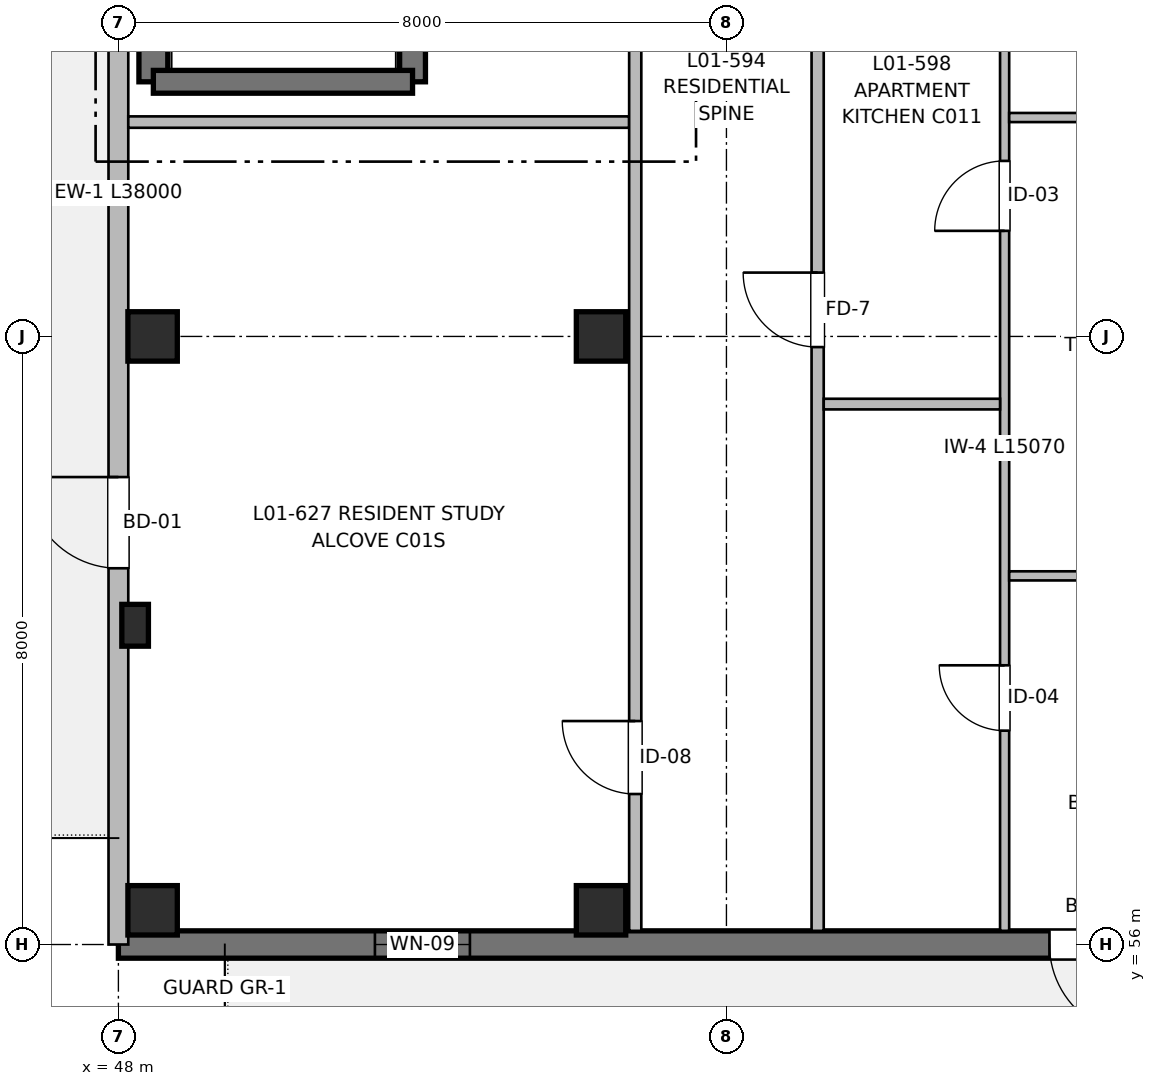
"""IFC4 building model, lengths in metres.
Left out: names, types, materials, properties, quantities, classifications, styles, units other than length and angle.
Written with IfcOpenShell. Run it as: python <this file> out.ifc"""

import sys

from ifc_helpers import new_model, si_unit, direction, frame, frame_2d, origin, origin_2d, place, context, subcontext, project, spatial, rectangle, extrude, element, fill, save


model = new_model("IFC4")
c1 = context("Model", 3, precision=1e-05, world=origin(), true_north=direction((0.0, 1.0)))
c2 = subcontext(c1, "Body", "Model", "MODEL_VIEW")
j1 = project(units=[si_unit("LENGTHUNIT", "METRE"), si_unit("PLANEANGLEUNIT", "RADIAN")], contexts=[c1])
p1 = place(None, origin())
s1 = spatial("IfcSite", under=j1, at=p1, CompositionType="ELEMENT")
p2 = place(p1, origin())
s2 = spatial("IfcBuilding", under=s1, at=p2, CompositionType="ELEMENT")
p3 = place(p2, frame((0.0, 0.0, 4.16)))
s3 = spatial("IfcBuildingStorey", under=s2, at=p3, CompositionType="ELEMENT", Elevation=4.16)
p4 = place(p3, frame((48.22, 60.2, 0.0), z_axis=(0.0, 0.0, 1.0), x_axis=(1.0, 0.0, 0.0)))
e1 = element("IfcColumn", 1, at=p4, inside=s3, PredefinedType="PILASTER", context=c2, shape_type="SweptSolid", body=[
    extrude(rectangle(XDim=0.35, YDim=0.55, at=origin_2d()), origin(), (0.0, 0.0, 1.0), 3.2),
])
for number, where, z_axis, x_axis in (
    (2, (48.45, 56.45, 0.0), (0.0, 0.0, 1.0), (1.0, 0.0, 0.0)),
    (3, (48.45, 64.0, 0.0), (0.0, 0.0, 1.0), (1.0, 0.0, 0.0)),
    (4, (54.35, 56.45, 0.0), (0.0, 0.0, 1.0), (1.0, 0.0, 0.0)),
    (5, (54.35, 64.0, 0.0), (0.0, 0.0, 1.0), (1.0, 0.0, 0.0)),
):
    element("IfcColumn", number, at=place(p3, frame(where, z_axis=z_axis, x_axis=x_axis)), inside=s3, PredefinedType="COLUMN", context=c2, shape_type="SweptSolid", body=[
        extrude(rectangle(XDim=0.65, YDim=0.65, at=origin_2d()), origin(), (0.0, 0.0, 1.0), 3.2),
    ])
p5 = place(p3, frame((48.46, 67.35, 0.0), z_axis=(0.0, 0.0, 1.0), x_axis=(0.0, 1.0, 0.0)))
e6 = element("IfcWall", 6, at=p5, inside=s3, PredefinedType="SHEAR", context=c2, shape_type="SweptSolid", body=[
    extrude(rectangle(XDim=12.45, YDim=0.38, at=frame_2d((6.225, 0.0))), origin(), (0.0, 0.0, 1.0), 3.2),
])
p6 = place(p5, frame((2.2, 0.0, 0.97)))
e7 = element("IfcOpeningElement", 7, at=p6, cuts=e6, PredefinedType="OPENING", context=c2, shape_type="SweptSolid", body=[
    extrude(rectangle(XDim=0.95, YDim=1.25, at=frame_2d((0.475, 0.625))), frame((0.0, 0.2, 0.0), z_axis=(0.0, -1.0, 0.0), x_axis=(1.0, 0.0, 0.0)), (0.0, 0.0, 1.0), 0.4),
])
p7 = place(p3, frame((51.87, 79.8, 0.0), z_axis=(0.0, 0.0, 1.0), x_axis=(0.0, -1.0, 0.0)))
e8 = element("IfcWall", 8, at=p7, inside=s3, PredefinedType="SHEAR", context=c2, shape_type="SweptSolid", body=[
    extrude(rectangle(XDim=12.45, YDim=0.34, at=frame_2d((6.225, 0.0))), origin(), (0.0, 0.0, 1.0), 3.2),
])
p8 = place(p7, frame((10.85, 0.0, 0.0)))
e9 = element("IfcOpeningElement", 9, at=p8, cuts=e8, PredefinedType="OPENING", context=c2, shape_type="SweptSolid", body=[
    extrude(rectangle(XDim=1.05, YDim=2.15, at=frame_2d((0.525, 1.075))), frame((0.0, 0.18, 0.0), z_axis=(0.0, -1.0, 0.0), x_axis=(1.0, 0.0, 0.0)), (0.0, 0.0, 1.0), 0.36),
])
p9 = place(p3, frame((51.87, 67.35, 0.0), z_axis=(0.0, 0.0, 1.0), x_axis=(-1.0, 0.0, 0.0)))
e10 = element("IfcWall", 10, at=p9, inside=s3, PredefinedType="SHEAR", context=c2, shape_type="SweptSolid", body=[
    extrude(rectangle(XDim=3.41, YDim=0.3, at=frame_2d((1.705, 0.0))), origin(), (0.0, 0.0, 1.0), 3.2),
])
p10 = place(p3, frame((64.0, 56.0, 0.0), z_axis=(0.0, 0.0, 1.0), x_axis=(-1.0, 0.0, 0.0)))
e11 = element("IfcWall", 11, at=p10, inside=s3, PredefinedType="SHEAR", context=c2, shape_type="SweptSolid", body=[
    extrude(rectangle(XDim=16.0, YDim=0.36, at=frame_2d((8.0, 0.0))), origin(), (0.0, 0.0, 1.0), 2.98),
])
p11 = place(p10, frame((2.55, 0.0, 0.0)))
e12 = element("IfcOpeningElement", 12, at=p11, cuts=e11, PredefinedType="OPENING", context=c2, shape_type="SweptSolid", body=[
    extrude(rectangle(XDim=1.2, YDim=2.2, at=frame_2d((0.6, 1.1))), frame((0.0, 0.19, 0.0), z_axis=(0.0, -1.0, 0.0), x_axis=(1.0, 0.0, 0.0)), (0.0, 0.0, 1.0), 0.38),
])
p12 = place(p10, frame((11.375, 0.0, 0.87)))
e13 = element("IfcOpeningElement", 13, at=p12, cuts=e11, PredefinedType="OPENING", context=c2, shape_type="SweptSolid", body=[
    extrude(rectangle(XDim=1.25, YDim=1.35, at=frame_2d((0.625, 0.675))), frame((0.0, 0.19, 0.0), z_axis=(0.0, -1.0, 0.0), x_axis=(1.0, 0.0, 0.0)), (0.0, 0.0, 1.0), 0.38),
])
p13 = place(p3, frame((48.0, 56.0, 0.0), z_axis=(0.0, 0.0, 1.0), x_axis=(0.0, 1.0, 0.0)))
e14 = element("IfcWall", 14, at=p13, inside=s3, PredefinedType="SOLIDWALL", context=c2, shape_type="SweptSolid", body=[
    extrude(rectangle(XDim=38.0, YDim=0.26, at=frame_2d((19.0, 0.0))), origin(), (0.0, 0.0, 1.0), 2.98),
])
p14 = place(p13, frame((4.95, 0.0, 0.0)))
e15 = element("IfcOpeningElement", 15, at=p14, cuts=e14, PredefinedType="OPENING", context=c2, shape_type="SweptSolid", body=[
    extrude(rectangle(XDim=1.2, YDim=2.2, at=frame_2d((0.6, 1.1))), frame((0.0, 0.14, 0.0), z_axis=(0.0, -1.0, 0.0), x_axis=(1.0, 0.0, 0.0)), (0.0, 0.0, 1.0), 0.28),
])
p15 = place(p13, frame((13.625, 0.0, 0.87)))
e16 = element("IfcOpeningElement", 16, at=p15, cuts=e14, PredefinedType="OPENING", context=c2, shape_type="SweptSolid", body=[
    extrude(rectangle(XDim=1.25, YDim=1.35, at=frame_2d((0.625, 0.675))), frame((0.0, 0.14, 0.0), z_axis=(0.0, -1.0, 0.0), x_axis=(1.0, 0.0, 0.0)), (0.0, 0.0, 1.0), 0.28),
])
p16 = place(p13, frame((23.95, 0.0, 0.82)))
e17 = element("IfcOpeningElement", 17, at=p16, cuts=e14, PredefinedType="OPENING", context=c2, shape_type="SweptSolid", body=[
    extrude(rectangle(XDim=1.3, YDim=1.4, at=frame_2d((0.65, 0.7))), frame((0.0, 0.14, 0.0), z_axis=(0.0, -1.0, 0.0), x_axis=(1.0, 0.0, 0.0)), (0.0, 0.0, 1.0), 0.28),
])
p17 = place(p13, frame((32.2, 0.0, 0.67)))
e18 = element("IfcOpeningElement", 18, at=p17, cuts=e14, PredefinedType="OPENING", context=c2, shape_type="SweptSolid", body=[
    extrude(rectangle(XDim=2.1, YDim=1.55, at=frame_2d((1.05, 0.775))), frame((0.0, 0.14, 0.0), z_axis=(0.0, -1.0, 0.0), x_axis=(1.0, 0.0, 0.0)), (0.0, 0.0, 1.0), 0.28),
])
p18 = place(p3, frame((48.13, 66.82, 0.0), z_axis=(0.0, 0.0, 1.0), x_axis=(1.0, 0.0, 0.0)))
e19 = element("IfcWall", 19, at=p18, inside=s3, PredefinedType="PARTITIONING", context=c2, shape_type="SweptSolid", body=[
    extrude(rectangle(XDim=6.59, YDim=0.15, at=frame_2d((3.295, 0.0))), origin(), (0.0, 0.0, 1.0), 2.935),
])
p19 = place(p3, frame((54.8, 56.18, 0.0), z_axis=(0.0, 0.0, 1.0), x_axis=(0.0, 1.0, 0.0)))
e20 = element("IfcWall", 20, at=p19, inside=s3, PredefinedType="PARTITIONING", context=c2, shape_type="SweptSolid", body=[
    extrude(rectangle(XDim=50.62, YDim=0.16, at=frame_2d((25.31, 0.0))), origin(), (0.0, 0.0, 1.0), 2.935),
])
p20 = place(p19, frame((12.82, 0.0, 0.0)))
e21 = element("IfcOpeningElement", 21, at=p20, cuts=e20, PredefinedType="OPENING", context=c2, shape_type="SweptSolid", body=[
    extrude(rectangle(XDim=1.1, YDim=2.15, at=frame_2d((0.55, 1.075))), frame((0.0, 0.09, 0.0), z_axis=(0.0, -1.0, 0.0), x_axis=(1.0, 0.0, 0.0)), (0.0, 0.0, 1.0), 0.18),
])
p21 = place(p19, frame((19.22, 0.0, 0.0)))
e22 = element("IfcOpeningElement", 22, at=p21, cuts=e20, PredefinedType="OPENING", context=c2, shape_type="SweptSolid", body=[
    extrude(rectangle(XDim=1.6, YDim=2.15, at=frame_2d((0.8, 1.075))), frame((0.0, 0.09, 0.0), z_axis=(0.0, -1.0, 0.0), x_axis=(1.0, 0.0, 0.0)), (0.0, 0.0, 1.0), 0.18),
])
p22 = place(p19, frame((1.8, 0.0, 0.0)))
e23 = element("IfcOpeningElement", 23, at=p22, cuts=e20, PredefinedType="OPENING", context=c2, shape_type="SweptSolid", body=[
    extrude(rectangle(XDim=0.96, YDim=2.15, at=frame_2d((0.48, 1.075))), frame((0.0, 0.09, 0.0), z_axis=(0.0, -1.0, 0.0), x_axis=(1.0, 0.0, 0.0)), (0.0, 0.0, 1.0), 0.18),
])
p23 = place(p19, frame((32.725, 0.0, 0.0)))
e24 = element("IfcOpeningElement", 24, at=p23, cuts=e20, PredefinedType="OPENING", context=c2, shape_type="SweptSolid", body=[
    extrude(rectangle(XDim=0.98, YDim=2.15, at=frame_2d((0.49, 1.075))), frame((0.0, 0.09, 0.0), z_axis=(0.0, -1.0, 0.0), x_axis=(1.0, 0.0, 0.0)), (0.0, 0.0, 1.0), 0.18),
])
p24 = place(p19, frame((40.935, 0.0, 0.0)))
e25 = element("IfcOpeningElement", 25, at=p24, cuts=e20, PredefinedType="OPENING", context=c2, shape_type="SweptSolid", body=[
    extrude(rectangle(XDim=0.98, YDim=2.15, at=frame_2d((0.49, 1.075))), frame((0.0, 0.09, 0.0), z_axis=(0.0, -1.0, 0.0), x_axis=(1.0, 0.0, 0.0)), (0.0, 0.0, 1.0), 0.18),
])
p25 = place(p3, frame((57.2, 56.18, 0.0), z_axis=(0.0, 0.0, 1.0), x_axis=(0.0, 1.0, 0.0)))
e26 = element("IfcWall", 26, at=p25, inside=s3, PredefinedType="PARTITIONING", context=c2, shape_type="SweptSolid", body=[
    extrude(rectangle(XDim=50.62, YDim=0.16, at=frame_2d((25.31, 0.0))), origin(), (0.0, 0.0, 1.0), 2.935),
])
p26 = place(p25, frame((7.68, 0.0, 0.0)))
e27 = element("IfcOpeningElement", 27, at=p26, cuts=e26, PredefinedType="OPENING", context=c2, shape_type="SweptSolid", body=[
    extrude(rectangle(XDim=0.98, YDim=2.15, at=frame_2d((0.49, 1.075))), frame((0.0, 0.09, 0.0), z_axis=(0.0, -1.0, 0.0), x_axis=(1.0, 0.0, 0.0)), (0.0, 0.0, 1.0), 0.18),
])
p27 = place(p25, frame((22.43, 0.0, 0.0)))
e28 = element("IfcOpeningElement", 28, at=p27, cuts=e26, PredefinedType="OPENING", context=c2, shape_type="SweptSolid", body=[
    extrude(rectangle(XDim=1.02, YDim=2.15, at=frame_2d((0.51, 1.075))), frame((0.0, 0.09, 0.0), z_axis=(0.0, -1.0, 0.0), x_axis=(1.0, 0.0, 0.0)), (0.0, 0.0, 1.0), 0.18),
])
p28 = place(p25, frame((35.65, 0.0, 0.0)))
e29 = element("IfcOpeningElement", 29, at=p28, cuts=e26, PredefinedType="OPENING", context=c2, shape_type="SweptSolid", body=[
    extrude(rectangle(XDim=0.98, YDim=2.15, at=frame_2d((0.49, 1.075))), frame((0.0, 0.09, 0.0), z_axis=(0.0, -1.0, 0.0), x_axis=(1.0, 0.0, 0.0)), (0.0, 0.0, 1.0), 0.18),
])
p29 = place(p25, frame((46.42, 0.0, 0.0)))
e30 = element("IfcOpeningElement", 30, at=p29, cuts=e26, PredefinedType="OPENING", context=c2, shape_type="SweptSolid", body=[
    extrude(rectangle(XDim=0.98, YDim=2.15, at=frame_2d((0.49, 1.075))), frame((0.0, 0.09, 0.0), z_axis=(0.0, -1.0, 0.0), x_axis=(1.0, 0.0, 0.0)), (0.0, 0.0, 1.0), 0.18),
])
p30 = place(p3, frame((59.66, 56.18, 0.0), z_axis=(0.0, 0.0, 1.0), x_axis=(0.0, 1.0, 0.0)))
e31 = element("IfcWall", 31, at=p30, inside=s3, PredefinedType="PARTITIONING", context=c2, shape_type="SweptSolid", body=[
    extrude(rectangle(XDim=15.07, YDim=0.12, at=frame_2d((7.535, 0.0))), origin(), (0.0, 0.0, 1.0), 2.935),
])
p31 = place(p30, frame((2.633, 0.0, 0.0)))
e32 = element("IfcOpeningElement", 32, at=p31, cuts=e31, PredefinedType="OPENING", context=c2, shape_type="SweptSolid", body=[
    extrude(rectangle(XDim=0.86, YDim=2.1, at=frame_2d((0.43, 1.05))), frame((0.0, 0.07, 0.0), z_axis=(0.0, -1.0, 0.0), x_axis=(1.0, 0.0, 0.0)), (0.0, 0.0, 1.0), 0.14),
])
p32 = place(p30, frame((9.209, 0.0, 0.0)))
e33 = element("IfcOpeningElement", 33, at=p32, cuts=e31, PredefinedType="OPENING", context=c2, shape_type="SweptSolid", body=[
    extrude(rectangle(XDim=0.92, YDim=2.1, at=frame_2d((0.46, 1.05))), frame((0.0, 0.07, 0.0), z_axis=(0.0, -1.0, 0.0), x_axis=(1.0, 0.0, 0.0)), (0.0, 0.0, 1.0), 0.14),
])
p33 = place(p3, frame((57.28, 63.11, 0.0), z_axis=(0.0, 0.0, 1.0), x_axis=(1.0, 0.0, 0.0)))
e34 = element("IfcWall", 34, at=p33, inside=s3, PredefinedType="PARTITIONING", context=c2, shape_type="SweptSolid", body=[
    extrude(rectangle(XDim=2.32, YDim=0.14, at=frame_2d((1.16, 0.0))), origin(), (0.0, 0.0, 1.0), 2.935),
])
p34 = place(p3, frame((59.72, 60.85, 0.0), z_axis=(0.0, 0.0, 1.0), x_axis=(1.0, 0.0, 0.0)))
e35 = element("IfcWall", 35, at=p34, inside=s3, PredefinedType="PARTITIONING", context=c2, shape_type="SweptSolid", body=[
    extrude(rectangle(XDim=4.15, YDim=0.12, at=frame_2d((2.075, 0.0))), origin(), (0.0, 0.0, 1.0), 2.935),
])
p35 = place(p34, frame((1.625, 0.0, 0.0)))
e36 = element("IfcOpeningElement", 36, at=p35, cuts=e35, PredefinedType="OPENING", context=c2, shape_type="SweptSolid", body=[
    extrude(rectangle(XDim=0.9, YDim=2.1, at=frame_2d((0.45, 1.05))), frame((0.0, 0.07, 0.0), z_axis=(0.0, -1.0, 0.0), x_axis=(1.0, 0.0, 0.0)), (0.0, 0.0, 1.0), 0.14),
])
p36 = place(p3, frame((59.72, 66.88, 0.0), z_axis=(0.0, 0.0, 1.0), x_axis=(1.0, 0.0, 0.0)))
e37 = element("IfcWall", 37, at=p36, inside=s3, PredefinedType="PARTITIONING", context=c2, shape_type="SweptSolid", body=[
    extrude(rectangle(XDim=4.15, YDim=0.12, at=frame_2d((2.075, 0.0))), origin(), (0.0, 0.0, 1.0), 2.935),
])
p37 = place(p36, frame((1.635, 0.0, 0.0)))
e38 = element("IfcOpeningElement", 38, at=p37, cuts=e37, PredefinedType="OPENING", context=c2, shape_type="SweptSolid", body=[
    extrude(rectangle(XDim=0.88, YDim=2.1, at=frame_2d((0.44, 1.05))), frame((0.0, 0.07, 0.0), z_axis=(0.0, -1.0, 0.0), x_axis=(1.0, 0.0, 0.0)), (0.0, 0.0, 1.0), 0.14),
])
p38 = place(p11, origin())
e39 = element("IfcDoor", 39, at=p38, inside=s3, OperationType="SINGLE_SWING_LEFT", PredefinedType="DOOR", context=c2, shape_type="SweptSolid", body=[
    extrude(rectangle(XDim=1.2, YDim=2.2, at=frame_2d((0.6, 1.1))), frame((0.0, 0.025, 0.0), z_axis=(0.0, -1.0, 0.0), x_axis=(1.0, 0.0, 0.0)), (0.0, 0.0, 1.0), 0.05),
])
fill(e12, e39)
p39 = place(p12, origin())
e40 = element("IfcWindow", 40, at=p39, inside=s3, PartitioningType="SINGLE_PANEL", PredefinedType="WINDOW", context=c2, shape_type="SweptSolid", body=[
    extrude(rectangle(XDim=1.25, YDim=1.35, at=frame_2d((0.625, 0.675))), frame((0.0, 0.03, 0.0), z_axis=(0.0, -1.0, 0.0), x_axis=(1.0, 0.0, 0.0)), (0.0, 0.0, 1.0), 0.06),
])
fill(e13, e40)
p40 = place(p14, origin())
e41 = element("IfcDoor", 41, at=p40, inside=s3, OperationType="SINGLE_SWING_RIGHT", PredefinedType="DOOR", context=c2, shape_type="SweptSolid", body=[
    extrude(rectangle(XDim=1.2, YDim=2.2, at=frame_2d((0.6, 1.1))), frame((0.0, 0.025, 0.0), z_axis=(0.0, -1.0, 0.0), x_axis=(1.0, 0.0, 0.0)), (0.0, 0.0, 1.0), 0.05),
])
fill(e15, e41)
p41 = place(p31, origin())
e42 = element("IfcDoor", 42, at=p41, inside=s3, OperationType="SINGLE_SWING_RIGHT", PredefinedType="DOOR", context=c2, shape_type="SweptSolid", body=[
    extrude(rectangle(XDim=0.86, YDim=2.1, at=frame_2d((0.43, 1.05))), frame((0.0, 0.025, 0.0), z_axis=(0.0, -1.0, 0.0), x_axis=(1.0, 0.0, 0.0)), (0.0, 0.0, 1.0), 0.05),
])
fill(e32, e42)
p42 = place(p32, origin())
e43 = element("IfcDoor", 43, at=p42, inside=s3, OperationType="SINGLE_SWING_LEFT", PredefinedType="DOOR", context=c2, shape_type="SweptSolid", body=[
    extrude(rectangle(XDim=0.92, YDim=2.1, at=frame_2d((0.46, 1.05))), frame((0.0, 0.025, 0.0), z_axis=(0.0, -1.0, 0.0), x_axis=(1.0, 0.0, 0.0)), (0.0, 0.0, 1.0), 0.05),
])
fill(e33, e43)
p43 = place(p26, origin())
e44 = element("IfcDoor", 44, at=p43, inside=s3, OperationType="SINGLE_SWING_RIGHT", PredefinedType="DOOR", context=c2, shape_type="SweptSolid", body=[
    extrude(rectangle(XDim=0.98, YDim=2.15, at=frame_2d((0.49, 1.075))), frame((0.0, 0.025, 0.0), z_axis=(0.0, -1.0, 0.0), x_axis=(1.0, 0.0, 0.0)), (0.0, 0.0, 1.0), 0.05),
])
fill(e27, e44)
p44 = place(p22, origin())
e45 = element("IfcDoor", 45, at=p44, inside=s3, OperationType="SINGLE_SWING_RIGHT", PredefinedType="DOOR", context=c2, shape_type="SweptSolid", body=[
    extrude(rectangle(XDim=0.96, YDim=2.15, at=frame_2d((0.48, 1.075))), frame((0.0, 0.025, 0.0), z_axis=(0.0, -1.0, 0.0), x_axis=(1.0, 0.0, 0.0)), (0.0, 0.0, 1.0), 0.05),
])
fill(e23, e45)
save(model, sys.argv[1])
